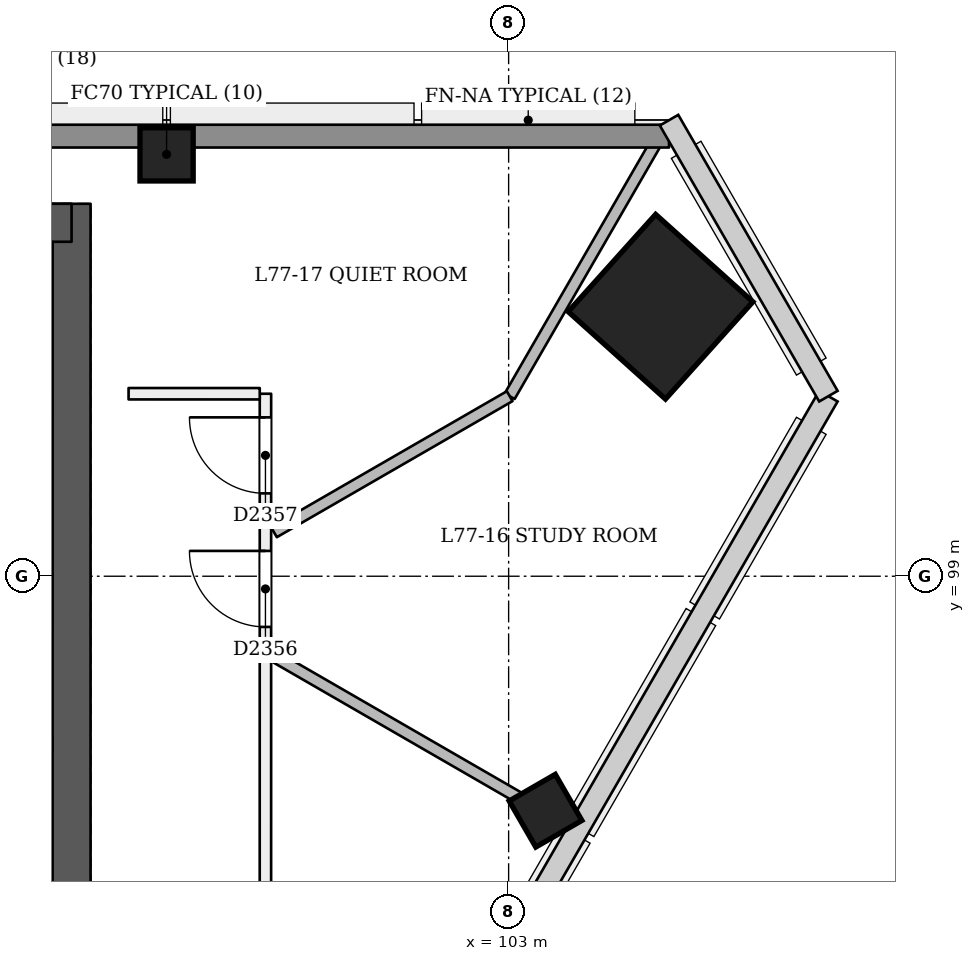
"""IFC4 building model, lengths in metres.
Left out: names, types, materials, properties, quantities, classifications, styles, units other than length and angle.
Written with IfcOpenShell. Run it as: python <this file> out.ifc"""

import sys

from ifc_helpers import new_model, si_unit, direction, frame, frame_2d, origin, origin_2d, place, context, subcontext, project, spatial, rectangle, extrude, element, fill, save


model = new_model("IFC4")
c1 = context("Model", 3, precision=1e-05, world=origin(), true_north=direction((0.0, 1.0)))
c2 = subcontext(c1, "Body", "Model", "MODEL_VIEW")
j1 = project(units=[si_unit("LENGTHUNIT", "METRE"), si_unit("PLANEANGLEUNIT", "RADIAN")], contexts=[c1])
p1 = place(None, origin())
s1 = spatial("IfcSite", under=j1, at=p1, CompositionType="ELEMENT")
p2 = place(p1, origin())
s2 = spatial("IfcBuilding", under=s1, at=p2, CompositionType="ELEMENT")
p3 = place(p2, frame((0.0, 0.0, 298.6)))
s3 = spatial("IfcBuildingStorey", under=s2, at=p3, CompositionType="ELEMENT", Elevation=298.6)
p4 = place(p3, frame((97.25, 93.15, 0.0), z_axis=(0.0, 0.0, 1.0), x_axis=(0.0, 1.0, 0.0)))
e1 = element("IfcWall", 1, at=p4, inside=s3, PredefinedType="SHEAR", context=c2, shape_type="SweptSolid", body=[
    extrude(rectangle(XDim=10.75, YDim=0.5, at=frame_2d((5.375, 0.0))), origin(), (0.0, 0.0, 1.0), 3.6),
])
p5 = place(p3, frame((97.25, 103.65, 0.0), z_axis=(0.0, 0.0, 1.0), x_axis=(-1.0, 0.0, 0.0)))
e2 = element("IfcWall", 2, at=p5, inside=s3, PredefinedType="SHEAR", context=c2, shape_type="SweptSolid", body=[
    extrude(rectangle(XDim=24.75, YDim=0.5, at=frame_2d((12.375, 0.0))), origin(), (0.0, 0.0, 1.0), 3.6),
])
p6 = place(p3, frame((105.033, 102.534, 0.0), z_axis=(-0.028403739082, 0.009219352065, 0.999554016126), x_axis=(0.500752505368, -0.865305502665, 0.022210705196)))
e3 = element("IfcColumn", 3, at=p6, inside=s3, PredefinedType="COLUMN", context=c2, shape_type="SweptSolid", body=[
    extrude(rectangle(XDim=1.72, YDim=1.72, at=origin_2d()), origin(), (0.0, 0.0, 1.0), 3.602),
])
p7 = place(p3, frame((98.5, 104.55, 0.0), z_axis=(0.0, 0.0, 1.0), x_axis=(1.0, 0.0, 0.0)))
e4 = element("IfcColumn", 4, at=p7, inside=s3, PredefinedType="COLUMN", context=c2, shape_type="SweptSolid", body=[
    extrude(rectangle(XDim=0.7, YDim=0.7, at=origin_2d()), origin(), (0.0, 0.0, 1.0), 3.6),
])
p8 = place(p3, frame((103.512, 95.868, -0.021), z_axis=(-0.02215519141, 0.038415882353, 0.999016199807), x_axis=(-0.500652808024, -0.865364144442, 0.02217348265)))
e5 = element("IfcColumn", 5, at=p8, inside=s3, PredefinedType="COLUMN", context=c2, shape_type="SweptSolid", body=[
    extrude(rectangle(XDim=0.7, YDim=0.7, at=origin_2d()), origin(), (0.0, 0.0, 1.0), 3.604),
])
p9 = place(p3, frame((99.8, 90.7, 0.0), z_axis=(0.0, 0.0, 1.0), x_axis=(6.844627e-05, 0.999999997658, 0.0)))
e6 = element("IfcWall", 6, at=p9, inside=s3, PredefinedType="PARTITIONING", context=c2, shape_type="SweptSolid", body=[
    extrude(rectangle(XDim=10.701, YDim=0.15, at=frame_2d((5.35, 0.0))), origin(), (0.0, 0.0, 1.0), 3.2),
])
p10 = place(p9, frame((7.633, 0.0, 0.0)))
e7 = element("IfcOpeningElement", 7, at=p10, cuts=e6, PredefinedType="OPENING", context=c2, shape_type="SweptSolid", body=[
    extrude(rectangle(XDim=1.0, YDim=2.1, at=frame_2d((0.5, 1.05))), frame((0.0, 0.085, 0.0), z_axis=(0.0, -1.0, 0.0), x_axis=(1.0, 0.0, 0.0)), (0.0, 0.0, 1.0), 0.171),
])
p11 = place(p9, frame((9.39, 0.0, 0.0)))
e8 = element("IfcOpeningElement", 8, at=p11, cuts=e6, PredefinedType="OPENING", context=c2, shape_type="SweptSolid", body=[
    extrude(rectangle(XDim=1.0, YDim=2.1, at=frame_2d((0.5, 1.05))), frame((0.0, 0.085, 0.0), z_axis=(0.0, -1.0, 0.0), x_axis=(1.0, 0.0, 0.0)), (0.0, 0.0, 1.0), 0.171),
])
p12 = place(p3, frame((99.726, 101.401, 0.0), z_axis=(0.0, 0.0, 1.0), x_axis=(-0.999999989991, 0.000141482738, 0.0)))
e9 = element("IfcWall", 9, at=p12, inside=s3, PredefinedType="PARTITIONING", context=c2, shape_type="SweptSolid", body=[
    extrude(rectangle(XDim=1.726, YDim=0.15, at=frame_2d((0.863, 0.0))), origin(), (0.0, 0.0, 1.0), 3.2),
])
p13 = place(p3, frame((103.815, 95.694, 0.0), z_axis=(0.0, 0.0, 1.0), x_axis=(-0.866020461467, 0.500008560247, 0.0)))
e10 = element("IfcWall", 10, at=p13, inside=s3, PredefinedType="PARTITIONING", context=c2, shape_type="SweptSolid", body=[
    extrude(rectangle(XDim=4.506, YDim=0.15, at=frame_2d((2.253, 0.0))), origin(), (0.0, 0.0, 1.0), 2.7),
])
p14 = place(p3, frame((105.053, 104.9, 0.0), z_axis=(0.0, 0.0, 1.0), x_axis=(-0.500009237349, -0.866020070533, 0.0)))
e11 = element("IfcWall", 11, at=p14, inside=s3, PredefinedType="PARTITIONING", context=c2, shape_type="SweptSolid", body=[
    extrude(rectangle(XDim=4.078, YDim=0.15, at=frame_2d((2.039, 0.0))), origin(), (0.0, 0.0, 1.0), 2.7),
])
p15 = place(p3, frame((103.014, 101.369, 0.0), z_axis=(0.0, 0.0, 1.0), x_axis=(-0.866023212093, -0.500003796101, 0.0)))
e12 = element("IfcWall", 12, at=p15, inside=s3, PredefinedType="PARTITIONING", context=c2, shape_type="SweptSolid", body=[
    extrude(rectangle(XDim=3.581, YDim=0.15, at=frame_2d((1.79, 0.0))), origin(), (0.0, 0.0, 1.0), 3.2),
])
p16 = place(p3, frame((64.889, 104.79, 0.0), z_axis=(0.0, 0.0, 1.0), x_axis=(1.0, 0.0, 0.0)))
e13 = element("IfcWall", 13, at=p16, inside=s3, PredefinedType="SOLIDWALL", context=c2, shape_type="SweptSolid", body=[
    extrude(rectangle(XDim=40.221, YDim=0.3, at=frame_2d((20.111, 0.0))), origin(), (0.0, 0.0, 1.0), 2.7),
])
p17 = place(p10, origin())
e14 = element("IfcDoor", 14, at=p17, inside=s3, OperationType="SINGLE_SWING_RIGHT", PredefinedType="NOTDEFINED", context=c2, shape_type="SweptSolid", body=[
    extrude(rectangle(XDim=1.0, YDim=2.1, at=frame_2d((0.5, 1.05))), frame((0.0, 0.025, 0.0), z_axis=(0.0, -1.0, 0.0), x_axis=(1.0, 0.0, 0.0)), (0.0, 0.0, 1.0), 0.05),
])
fill(e7, e14)
p18 = place(p11, origin())
e15 = element("IfcDoor", 15, at=p18, inside=s3, OperationType="SINGLE_SWING_RIGHT", PredefinedType="NOTDEFINED", context=c2, shape_type="SweptSolid", body=[
    extrude(rectangle(XDim=1.0, YDim=2.1, at=frame_2d((0.5, 1.05))), frame((0.0, 0.025, 0.0), z_axis=(0.0, -1.0, 0.0), x_axis=(1.0, 0.0, 0.0)), (0.0, 0.0, 1.0), 0.05),
])
fill(e8, e15)
save(model, sys.argv[1])
